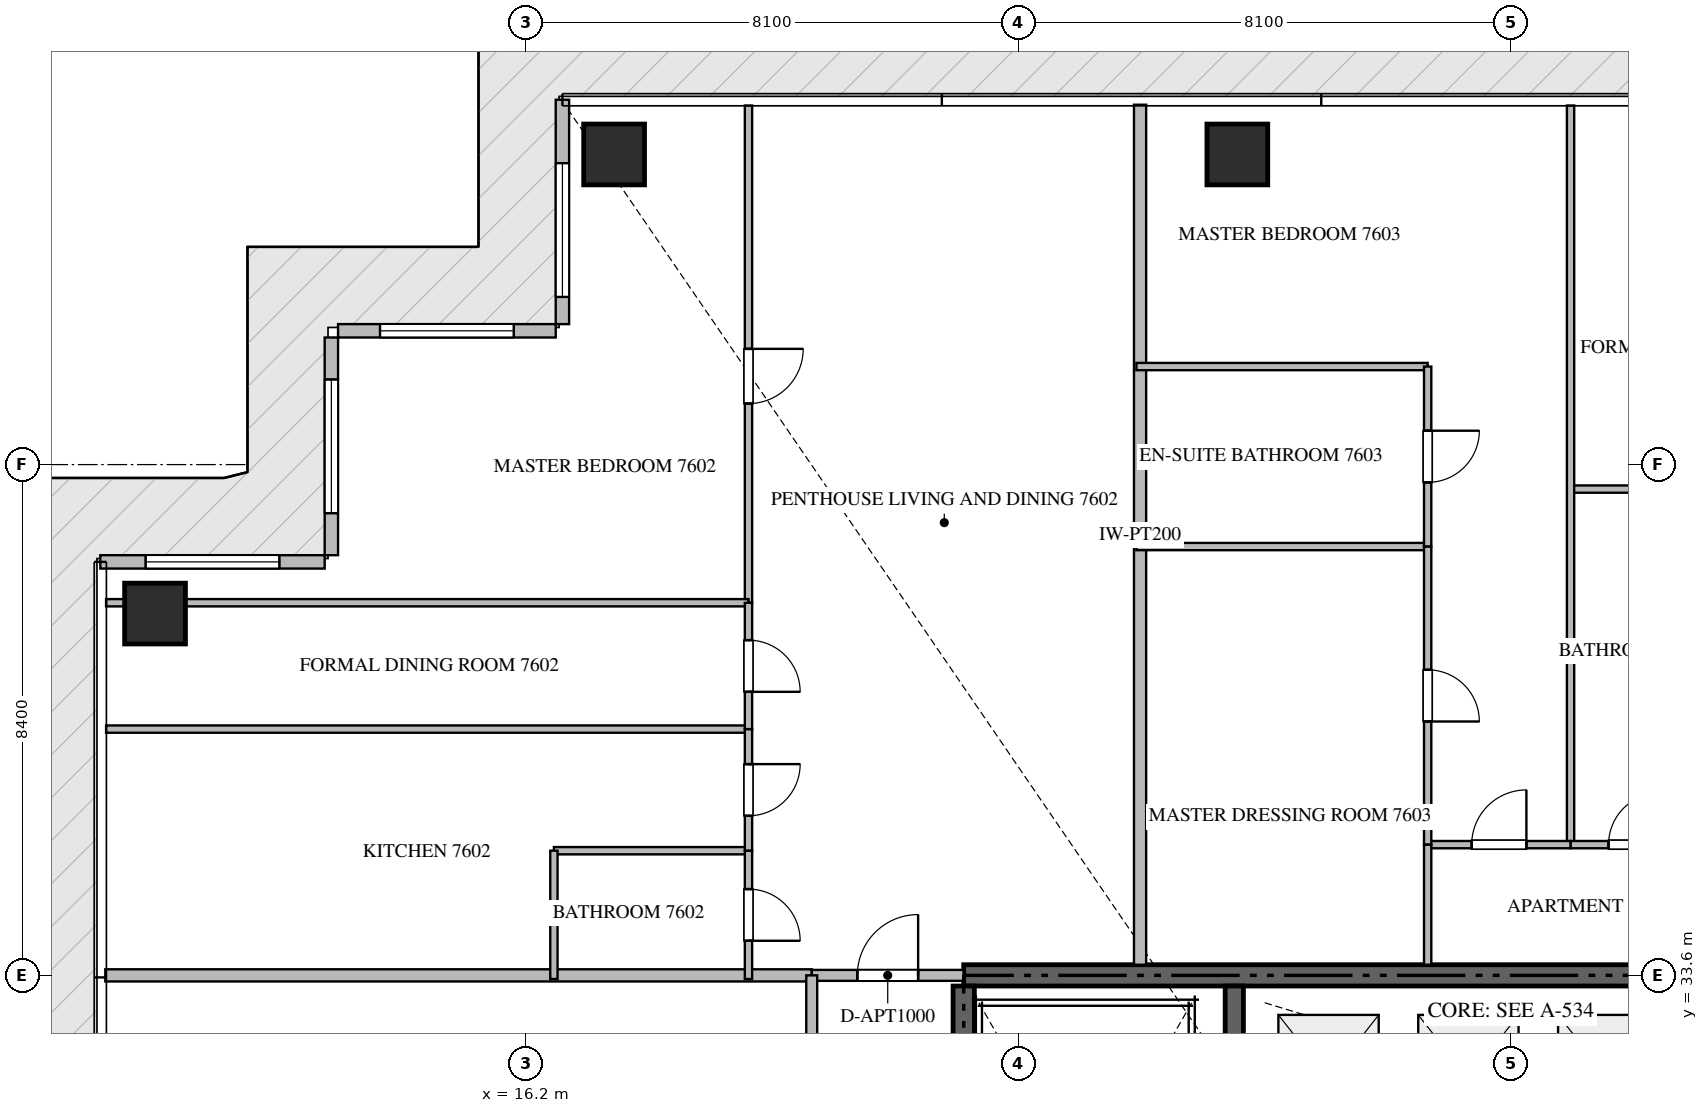
"""IFC4 building model, lengths in metres.
Left out: names, types, materials, properties, quantities, classifications, styles, units other than length and angle.
Written with IfcOpenShell. Run it as: python <this file> out.ifc"""

import sys

from ifc_helpers import new_model, si_unit, direction, frame, frame_2d, origin, origin_2d, place, context, subcontext, project, spatial, rectangle, extrude, source, transform, mapped, element, fill, save


model = new_model("IFC4")
c1 = context("Model", 3, precision=1e-05, world=origin(), true_north=direction((0.0, 1.0)))
c2 = subcontext(c1, "Body", "Model", "MODEL_VIEW")
j1 = project(units=[si_unit("LENGTHUNIT", "METRE"), si_unit("PLANEANGLEUNIT", "RADIAN")], contexts=[c1])
p1 = place(None, origin())
s1 = spatial("IfcSite", under=j1, at=p1, CompositionType="ELEMENT")
p2 = place(p1, origin())
s2 = spatial("IfcBuilding", under=s1, at=p2, CompositionType="ELEMENT")
p3 = place(p2, frame((0.0, 0.0, 305.6)))
s3 = spatial("IfcBuildingStorey", under=s2, at=p3, CompositionType="ELEMENT", Elevation=305.6)
p4 = place(p3, frame((41.4, 33.6, -0.26), z_axis=(0.0, 0.0, 1.0), x_axis=(-1.0, 0.0, 0.0)))
e1 = element("IfcWall", 1, at=p4, inside=s3, PredefinedType="SHEAR", context=c2, shape_type="SweptSolid", body=[
    extrude(rectangle(XDim=18.0, YDim=0.35, at=frame_2d((9.0, 0.0))), origin(), (0.0, 0.0, 1.0), 4.048),
])
p5 = place(p3, frame((23.4, 24.25, -0.26), z_axis=(0.0, 0.0, 1.0), x_axis=(0.0, 1.0, 0.0)))
e2 = element("IfcWall", 2, at=p5, inside=s3, PredefinedType="SHEAR", context=c2, shape_type="SweptSolid", body=[
    extrude(rectangle(XDim=9.175, YDim=0.35, at=frame_2d((4.587, 0.0))), origin(), (0.0, 0.0, 1.0), 4.048),
])
p6 = place(p3, frame((27.85, 23.55, -0.26), z_axis=(0.0, 0.0, 1.0), x_axis=(0.0, 1.0, 0.0)))
e3 = element("IfcWall", 3, at=p6, inside=s3, PredefinedType="SHEAR", context=c2, shape_type="SweptSolid", body=[
    extrude(rectangle(XDim=9.875, YDim=0.3, at=frame_2d((4.938, 0.0))), origin(), (0.0, 0.0, 1.0), 4.048),
])
m1 = source(origin(), c2, "Body", "SweptSolid", [
    extrude(rectangle(XDim=1.0, YDim=1.0, at=origin_2d()), origin(), (0.0, 0.0, 1.0), 4.05),
])
for number, where, z_axis, x_axis in (
    (4, (17.65, 47.1, -0.26), (0.0, 0.0, 1.0), (1.0, 0.0, 0.0)),
    (5, (27.9, 47.1, -0.26), (0.0, 0.0, 1.0), (1.0, 0.0, 0.0)),
    (6, (10.1, 39.55, -0.26), (0.0, 0.0, 1.0), (1.0, 0.0, 0.0)),
):
    element("IfcColumn", number, at=place(p3, frame(where, z_axis=z_axis, x_axis=x_axis)), inside=s3, PredefinedType="COLUMN", context=c2, shape_type="MappedRepresentation", body=[
        mapped(m1, transform((0.0, 0.0, 0.0), scale=1.0)),
    ])
p7 = place(p3, frame((16.8, 48.0, 0.0), z_axis=(0.0, 0.0, 1.0), x_axis=(0.0, -1.0, 0.0)))
e7 = element("IfcWall", 7, at=p7, inside=s3, PredefinedType="ELEMENTEDWALL", context=c2, shape_type="SweptSolid", body=[
    extrude(rectangle(XDim=3.69, YDim=0.22, at=frame_2d((1.845, 0.0))), origin(), (0.0, 0.0, 1.0), 3.775),
])
p8 = place(p7, frame((1.043, 0.0, 0.65)))
e8 = element("IfcOpeningElement", 8, at=p8, cuts=e7, PredefinedType="OPENING", context=c2, shape_type="SweptSolid", body=[
    extrude(rectangle(XDim=2.2, YDim=2.4, at=frame_2d((1.1, 1.2))), frame((0.0, 0.12, 0.0), z_axis=(0.0, -1.0, 0.0), x_axis=(1.0, 0.0, 0.0)), (0.0, 0.0, 1.0), 0.24),
])
p9 = place(p3, frame((16.69, 44.2, 0.0), z_axis=(0.0, 0.0, 1.0), x_axis=(-1.0, 0.0, 0.0)))
e9 = element("IfcWall", 9, at=p9, inside=s3, PredefinedType="ELEMENTEDWALL", context=c2, shape_type="SweptSolid", body=[
    extrude(rectangle(XDim=3.58, YDim=0.22, at=frame_2d((1.79, 0.0))), origin(), (0.0, 0.0, 1.0), 3.775),
])
p10 = place(p9, frame((0.69, 0.0, 0.65)))
e10 = element("IfcOpeningElement", 10, at=p10, cuts=e9, PredefinedType="OPENING", context=c2, shape_type="SweptSolid", body=[
    extrude(rectangle(XDim=2.2, YDim=2.4, at=frame_2d((1.1, 1.2))), frame((0.0, 0.12, 0.0), z_axis=(0.0, -1.0, 0.0), x_axis=(1.0, 0.0, 0.0)), (0.0, 0.0, 1.0), 0.24),
])
p11 = place(p3, frame((13.0, 44.09, 0.0), z_axis=(0.0, 0.0, 1.0), x_axis=(0.0, -1.0, 0.0)))
e11 = element("IfcWall", 11, at=p11, inside=s3, PredefinedType="ELEMENTEDWALL", context=c2, shape_type="SweptSolid", body=[
    extrude(rectangle(XDim=3.58, YDim=0.22, at=frame_2d((1.79, 0.0))), origin(), (0.0, 0.0, 1.0), 3.775),
])
p12 = place(p11, frame((0.69, 0.0, 0.65)))
e12 = element("IfcOpeningElement", 12, at=p12, cuts=e11, PredefinedType="OPENING", context=c2, shape_type="SweptSolid", body=[
    extrude(rectangle(XDim=2.2, YDim=2.4, at=frame_2d((1.1, 1.2))), frame((0.0, 0.12, 0.0), z_axis=(0.0, -1.0, 0.0), x_axis=(1.0, 0.0, 0.0)), (0.0, 0.0, 1.0), 0.24),
])
p13 = place(p3, frame((12.89, 40.4, 0.0), z_axis=(0.0, 0.0, 1.0), x_axis=(-1.0, 0.0, 0.0)))
e13 = element("IfcWall", 13, at=p13, inside=s3, PredefinedType="ELEMENTEDWALL", context=c2, shape_type="SweptSolid", body=[
    extrude(rectangle(XDim=3.69, YDim=0.22, at=frame_2d((1.845, 0.0))), origin(), (0.0, 0.0, 1.0), 3.775),
])
p14 = place(p13, frame((0.745, 0.0, 0.65)))
e14 = element("IfcOpeningElement", 14, at=p14, cuts=e13, PredefinedType="OPENING", context=c2, shape_type="SweptSolid", body=[
    extrude(rectangle(XDim=2.2, YDim=2.4, at=frame_2d((1.1, 1.2))), frame((0.0, 0.12, 0.0), z_axis=(0.0, -1.0, 0.0), x_axis=(1.0, 0.0, 0.0)), (0.0, 0.0, 1.0), 0.24),
])
p15 = place(p3, frame((26.3, 33.775, 0.0), z_axis=(0.0, 0.0, 1.0), x_axis=(0.0, 1.0, 0.0)))
e15 = element("IfcWall", 15, at=p15, inside=s3, PredefinedType="PARTITIONING", context=c2, shape_type="SweptSolid", body=[
    extrude(rectangle(XDim=14.143, YDim=0.2, at=frame_2d((7.072, 0.0))), origin(), (0.0, 0.0, 1.0), 3.79),
])
p16 = place(p3, frame((9.282, 33.6, 0.0), z_axis=(0.0, 0.0, 1.0), x_axis=(1.0, 0.0, 0.0)))
e16 = element("IfcWall", 16, at=p16, inside=s3, PredefinedType="PARTITIONING", context=c2, shape_type="SweptSolid", body=[
    extrude(rectangle(XDim=11.618, YDim=0.2, at=frame_2d((5.809, 0.0))), origin(), (0.0, 0.0, 1.0), 3.79),
])
p17 = place(p3, frame((20.902, 33.6, 0.0), z_axis=(0.0, 0.0, 1.0), x_axis=(1.0, 0.0, 0.0)))
e17 = element("IfcWall", 17, at=p17, inside=s3, PredefinedType="PARTITIONING", context=c2, shape_type="SweptSolid", body=[
    extrude(rectangle(XDim=2.496, YDim=0.18, at=frame_2d((1.248, 0.0))), origin(), (0.0, 0.0, 1.0), 3.79),
])
p18 = place(p17, frame((0.748, 0.0, 0.0)))
e18 = element("IfcOpeningElement", 18, at=p18, cuts=e17, PredefinedType="OPENING", context=c2, shape_type="SweptSolid", body=[
    extrude(rectangle(XDim=1.0, YDim=2.15, at=frame_2d((0.5, 1.075))), frame((0.0, 0.1, 0.0), z_axis=(0.0, -1.0, 0.0), x_axis=(1.0, 0.0, 0.0)), (0.0, 0.0, 1.0), 0.2),
])
p19 = place(p3, frame((20.9, 16.8, 0.0), z_axis=(0.0, 0.0, 1.0), x_axis=(0.0, 1.0, 0.0)))
e19 = element("IfcWall", 19, at=p19, inside=s3, PredefinedType="PARTITIONING", context=c2, shape_type="SweptSolid", body=[
    extrude(rectangle(XDim=16.8, YDim=0.18, at=frame_2d((8.4, 0.0))), origin(), (0.0, 0.0, 1.0), 3.79),
])
p20 = place(p19, frame((4.803, 0.0, 0.0)))
e20 = element("IfcOpeningElement", 20, at=p20, cuts=e19, PredefinedType="OPENING", context=c2, shape_type="SweptSolid", body=[
    extrude(rectangle(XDim=1.0, YDim=2.15, at=frame_2d((0.5, 1.075))), frame((0.0, 0.1, 0.0), z_axis=(0.0, -1.0, 0.0), x_axis=(1.0, 0.0, 0.0)), (0.0, 0.0, 1.0), 0.2),
])
p21 = place(p19, frame((13.225, 0.0, 0.0)))
e21 = element("IfcOpeningElement", 21, at=p21, cuts=e19, PredefinedType="OPENING", context=c2, shape_type="SweptSolid", body=[
    extrude(rectangle(XDim=1.0, YDim=2.15, at=frame_2d((0.5, 1.075))), frame((0.0, 0.1, 0.0), z_axis=(0.0, -1.0, 0.0), x_axis=(1.0, 0.0, 0.0)), (0.0, 0.0, 1.0), 0.2),
])
p22 = place(p3, frame((19.86, 47.905, 0.0), z_axis=(0.0, 0.0, 1.0), x_axis=(0.0, -1.0, 0.0)))
e22 = element("IfcWall", 22, at=p22, inside=s3, PredefinedType="PARTITIONING", context=c2, shape_type="SweptSolid", body=[
    extrude(rectangle(XDim=8.177, YDim=0.12, at=frame_2d((4.088, 0.0))), origin(), (0.0, 0.0, 1.0), 3.79),
])
p23 = place(p22, frame((4.002, 0.0, 0.0)))
e23 = element("IfcOpeningElement", 23, at=p23, cuts=e22, PredefinedType="OPENING", context=c2, shape_type="SweptSolid", body=[
    extrude(rectangle(XDim=0.9, YDim=2.1, at=frame_2d((0.45, 1.05))), frame((0.0, 0.07, 0.0), z_axis=(0.0, -1.0, 0.0), x_axis=(1.0, 0.0, 0.0)), (0.0, 0.0, 1.0), 0.14),
])
p24 = place(p3, frame((9.295, 39.728, 0.0), z_axis=(0.0, 0.0, 1.0), x_axis=(1.0, 0.0, 0.0)))
e24 = element("IfcWall", 24, at=p24, inside=s3, PredefinedType="PARTITIONING", context=c2, shape_type="SweptSolid", body=[
    extrude(rectangle(XDim=10.565, YDim=0.12, at=frame_2d((5.283, 0.0))), origin(), (0.0, 0.0, 1.0), 3.292),
])
p25 = place(p3, frame((9.295, 37.65, 0.0), z_axis=(0.0, 0.0, 1.0), x_axis=(1.0, 0.0, 0.0)))
e25 = element("IfcWall", 25, at=p25, inside=s3, PredefinedType="PARTITIONING", context=c2, shape_type="SweptSolid", body=[
    extrude(rectangle(XDim=10.565, YDim=0.12, at=frame_2d((5.283, 0.0))), origin(), (0.0, 0.0, 1.0), 3.79),
])
p26 = place(p3, frame((16.66, 35.65, 0.0), z_axis=(0.0, 0.0, 1.0), x_axis=(1.0, 0.0, 0.0)))
e26 = element("IfcWall", 26, at=p26, inside=s3, PredefinedType="PARTITIONING", context=c2, shape_type="SweptSolid", body=[
    extrude(rectangle(XDim=3.2, YDim=0.12, at=frame_2d((1.6, 0.0))), origin(), (0.0, 0.0, 1.0), 3.79),
])
p27 = place(p3, frame((16.66, 35.65, 0.0), z_axis=(0.0, 0.0, 1.0), x_axis=(0.0, -1.0, 0.0)))
e27 = element("IfcWall", 27, at=p27, inside=s3, PredefinedType="PARTITIONING", context=c2, shape_type="SweptSolid", body=[
    extrude(rectangle(XDim=2.11, YDim=0.12, at=frame_2d((1.055, 0.0))), origin(), (0.0, 0.0, 1.0), 3.79),
])
p28 = place(p3, frame((19.86, 39.726, 0.0), z_axis=(0.0, 0.0, 1.0), x_axis=(0.0, -1.0, 0.0)))
e28 = element("IfcWall", 28, at=p28, inside=s3, PredefinedType="PARTITIONING", context=c2, shape_type="SweptSolid", body=[
    extrude(rectangle(XDim=2.076, YDim=0.12, at=frame_2d((1.038, 0.0))), origin(), (0.0, 0.0, 1.0), 3.79),
])
p29 = place(p28, frame((0.613, 0.0, 0.0)))
e29 = element("IfcOpeningElement", 29, at=p29, cuts=e28, PredefinedType="OPENING", context=c2, shape_type="SweptSolid", body=[
    extrude(rectangle(XDim=0.85, YDim=2.1, at=frame_2d((0.425, 1.05))), frame((0.0, 0.07, 0.0), z_axis=(0.0, -1.0, 0.0), x_axis=(1.0, 0.0, 0.0)), (0.0, 0.0, 1.0), 0.14),
])
p30 = place(p3, frame((19.86, 37.648, 0.0), z_axis=(0.0, 0.0, 1.0), x_axis=(0.0, -1.0, 0.0)))
e30 = element("IfcWall", 30, at=p30, inside=s3, PredefinedType="PARTITIONING", context=c2, shape_type="SweptSolid", body=[
    extrude(rectangle(XDim=1.998, YDim=0.12, at=frame_2d((0.999, 0.0))), origin(), (0.0, 0.0, 1.0), 3.79),
])
p31 = place(p30, frame((0.574, 0.0, 0.0)))
e31 = element("IfcOpeningElement", 31, at=p31, cuts=e30, PredefinedType="OPENING", context=c2, shape_type="SweptSolid", body=[
    extrude(rectangle(XDim=0.85, YDim=2.1, at=frame_2d((0.425, 1.05))), frame((0.0, 0.07, 0.0), z_axis=(0.0, -1.0, 0.0), x_axis=(1.0, 0.0, 0.0)), (0.0, 0.0, 1.0), 0.14),
])
p32 = place(p3, frame((19.86, 35.648, 0.0), z_axis=(0.0, 0.0, 1.0), x_axis=(0.0, -1.0, 0.0)))
e32 = element("IfcWall", 32, at=p32, inside=s3, PredefinedType="PARTITIONING", context=c2, shape_type="SweptSolid", body=[
    extrude(rectangle(XDim=2.108, YDim=0.12, at=frame_2d((1.054, 0.0))), origin(), (0.0, 0.0, 1.0), 3.79),
])
p33 = place(p32, frame((0.629, 0.0, 0.0)))
e33 = element("IfcOpeningElement", 33, at=p33, cuts=e32, PredefinedType="OPENING", context=c2, shape_type="SweptSolid", body=[
    extrude(rectangle(XDim=0.85, YDim=2.1, at=frame_2d((0.425, 1.05))), frame((0.0, 0.07, 0.0), z_axis=(0.0, -1.0, 0.0), x_axis=(1.0, 0.0, 0.0)), (0.0, 0.0, 1.0), 0.14),
])
p34 = place(p3, frame((33.38, 41.597, 0.0), z_axis=(0.0, 0.0, 1.0), x_axis=(1.0, 0.0, 0.0)))
e34 = element("IfcWall", 34, at=p34, inside=s3, PredefinedType="PARTITIONING", context=c2, shape_type="SweptSolid", body=[
    extrude(rectangle(XDim=5.12, YDim=0.12, at=frame_2d((2.56, 0.0))), origin(), (0.0, 0.0, 1.0), 3.79),
])
p35 = place(p3, frame((33.38, 47.905, 0.0), z_axis=(0.0, 0.0, 1.0), x_axis=(0.0, -1.0, 0.0)))
e35 = element("IfcWall", 35, at=p35, inside=s3, PredefinedType="PARTITIONING", context=c2, shape_type="SweptSolid", body=[
    extrude(rectangle(XDim=12.155, YDim=0.12, at=frame_2d((6.078, 0.0))), origin(), (0.0, 0.0, 1.0), 3.79),
])
p36 = place(p3, frame((33.38, 35.75, 0.0), z_axis=(0.0, 0.0, 1.0), x_axis=(1.0, 0.0, 0.0)))
e36 = element("IfcWall", 36, at=p36, inside=s3, PredefinedType="PARTITIONING", context=c2, shape_type="SweptSolid", body=[
    extrude(rectangle(XDim=2.1, YDim=0.12, at=frame_2d((1.05, 0.0))), origin(), (0.0, 0.0, 1.0), 3.79),
])
p37 = place(p36, frame((0.625, 0.0, 0.0)))
e37 = element("IfcOpeningElement", 37, at=p37, cuts=e36, PredefinedType="OPENING", context=c2, shape_type="SweptSolid", body=[
    extrude(rectangle(XDim=0.85, YDim=2.1, at=frame_2d((0.425, 1.05))), frame((0.0, 0.07, 0.0), z_axis=(0.0, -1.0, 0.0), x_axis=(1.0, 0.0, 0.0)), (0.0, 0.0, 1.0), 0.14),
])
p38 = place(p3, frame((31.03, 35.75, 0.0), z_axis=(0.0, 0.0, 1.0), x_axis=(1.0, 0.0, 0.0)))
e38 = element("IfcWall", 38, at=p38, inside=s3, PredefinedType="PARTITIONING", context=c2, shape_type="SweptSolid", body=[
    extrude(rectangle(XDim=2.348, YDim=0.12, at=frame_2d((1.174, 0.0))), origin(), (0.0, 0.0, 1.0), 3.79),
])
p39 = place(p38, frame((0.724, 0.0, 0.0)))
e39 = element("IfcOpeningElement", 39, at=p39, cuts=e38, PredefinedType="OPENING", context=c2, shape_type="SweptSolid", body=[
    extrude(rectangle(XDim=0.9, YDim=2.1, at=frame_2d((0.45, 1.05))), frame((0.0, 0.07, 0.0), z_axis=(0.0, -1.0, 0.0), x_axis=(1.0, 0.0, 0.0)), (0.0, 0.0, 1.0), 0.14),
])
for number, where, z_axis, x_axis in (
    (40, (26.24, 43.612, 0.0), (0.0, 0.0, 1.0), (1.0, 0.0, 0.0)),
    (41, (26.24, 40.652, 0.0), (0.0, 0.0, 1.0), (1.0, 0.0, 0.0)),
):
    element("IfcWall", number, at=place(p3, frame(where, z_axis=z_axis, x_axis=x_axis)), inside=s3, PredefinedType="PARTITIONING", context=c2, shape_type="SweptSolid", body=[
        extrude(rectangle(XDim=4.79, YDim=0.12, at=frame_2d((2.395, 0.0))), origin(), (0.0, 0.0, 1.0), 3.79),
    ])
p40 = place(p3, frame((31.03, 43.612, 0.0), z_axis=(0.0, 0.0, 1.0), x_axis=(0.0, -1.0, 0.0)))
e42 = element("IfcWall", 42, at=p40, inside=s3, PredefinedType="PARTITIONING", context=c2, shape_type="SweptSolid", body=[
    extrude(rectangle(XDim=2.96, YDim=0.12, at=frame_2d((1.48, 0.0))), origin(), (0.0, 0.0, 1.0), 3.79),
])
p41 = place(p40, frame((1.055, 0.0, 0.0)))
e43 = element("IfcOpeningElement", 43, at=p41, cuts=e42, PredefinedType="OPENING", context=c2, shape_type="SweptSolid", body=[
    extrude(rectangle(XDim=0.85, YDim=2.1, at=frame_2d((0.425, 1.05))), frame((0.0, 0.07, 0.0), z_axis=(0.0, -1.0, 0.0), x_axis=(1.0, 0.0, 0.0)), (0.0, 0.0, 1.0), 0.14),
])
p42 = place(p3, frame((31.03, 40.65, 0.0), z_axis=(0.0, 0.0, 1.0), x_axis=(0.0, -1.0, 0.0)))
e44 = element("IfcWall", 44, at=p42, inside=s3, PredefinedType="PARTITIONING", context=c2, shape_type="SweptSolid", body=[
    extrude(rectangle(XDim=4.9, YDim=0.12, at=frame_2d((2.45, 0.0))), origin(), (0.0, 0.0, 1.0), 3.79),
])
p43 = place(p42, frame((2.025, 0.0, 0.0)))
e45 = element("IfcOpeningElement", 45, at=p43, cuts=e44, PredefinedType="OPENING", context=c2, shape_type="SweptSolid", body=[
    extrude(rectangle(XDim=0.85, YDim=2.1, at=frame_2d((0.425, 1.05))), frame((0.0, 0.07, 0.0), z_axis=(0.0, -1.0, 0.0), x_axis=(1.0, 0.0, 0.0)), (0.0, 0.0, 1.0), 0.14),
])
p44 = place(p3, frame((31.03, 35.748, 0.0), z_axis=(0.0, 0.0, 1.0), x_axis=(0.0, -1.0, 0.0)))
e46 = element("IfcWall", 46, at=p44, inside=s3, PredefinedType="PARTITIONING", context=c2, shape_type="SweptSolid", body=[
    extrude(rectangle(XDim=1.973, YDim=0.12, at=frame_2d((0.987, 0.0))), origin(), (0.0, 0.0, 1.0), 3.79),
])
m2 = source(origin(), c2, "Body", "SweptSolid", [
    extrude(rectangle(XDim=2.2, YDim=2.4, at=frame_2d((1.1, 1.2))), frame((0.0, 0.03, 0.0), z_axis=(0.0, -1.0, 0.0), x_axis=(1.0, 0.0, 0.0)), (0.0, 0.0, 1.0), 0.06),
])
p45 = place(p8, origin())
e47 = element("IfcWindow", 47, at=p45, inside=s3, PartitioningType="SINGLE_PANEL", PredefinedType="WINDOW", context=c2, shape_type="MappedRepresentation", body=[
    mapped(m2, transform((0.0, 0.0, 0.0), scale=1.0)),
])
fill(e8, e47)
p46 = place(p10, origin())
e48 = element("IfcWindow", 48, at=p46, inside=s3, PartitioningType="SINGLE_PANEL", PredefinedType="WINDOW", context=c2, shape_type="MappedRepresentation", body=[
    mapped(m2, transform((0.0, 0.0, 0.0), scale=1.0)),
])
fill(e10, e48)
p47 = place(p12, origin())
e49 = element("IfcWindow", 49, at=p47, inside=s3, PartitioningType="SINGLE_PANEL", PredefinedType="WINDOW", context=c2, shape_type="MappedRepresentation", body=[
    mapped(m2, transform((0.0, 0.0, 0.0), scale=1.0)),
])
fill(e12, e49)
p48 = place(p14, origin())
e50 = element("IfcWindow", 50, at=p48, inside=s3, PartitioningType="SINGLE_PANEL", PredefinedType="WINDOW", context=c2, shape_type="MappedRepresentation", body=[
    mapped(m2, transform((0.0, 0.0, 0.0), scale=1.0)),
])
fill(e14, e50)
m3 = source(origin(), c2, "Body", "SweptSolid", [
    extrude(rectangle(XDim=1.0, YDim=2.15, at=frame_2d((0.5, 1.075))), frame((0.0, 0.025, 0.0), z_axis=(0.0, -1.0, 0.0), x_axis=(1.0, 0.0, 0.0)), (0.0, 0.0, 1.0), 0.05),
])
p49 = place(p18, origin())
e51 = element("IfcDoor", 51, at=p49, inside=s3, OperationType="SINGLE_SWING_RIGHT", PredefinedType="DOOR", context=c2, shape_type="MappedRepresentation", body=[
    mapped(m3, transform((0.0, 0.0, 0.0), scale=1.0)),
])
fill(e18, e51)
m4 = source(origin(), c2, "Body", "SweptSolid", [
    extrude(rectangle(XDim=0.9, YDim=2.1, at=frame_2d((0.45, 1.05))), frame((0.0, 0.025, 0.0), z_axis=(0.0, -1.0, 0.0), x_axis=(1.0, 0.0, 0.0)), (0.0, 0.0, 1.0), 0.05),
])
p50 = place(p23, origin())
e52 = element("IfcDoor", 52, at=p50, inside=s3, OperationType="SINGLE_SWING_LEFT", PredefinedType="DOOR", context=c2, shape_type="MappedRepresentation", body=[
    mapped(m4, transform((0.0, 0.0, 0.0), scale=1.0)),
])
fill(e23, e52)
m5 = source(origin(), c2, "Body", "SweptSolid", [
    extrude(rectangle(XDim=0.85, YDim=2.1, at=frame_2d((0.425, 1.05))), frame((0.0, 0.025, 0.0), z_axis=(0.0, -1.0, 0.0), x_axis=(1.0, 0.0, 0.0)), (0.0, 0.0, 1.0), 0.05),
])
p51 = place(p29, origin())
e53 = element("IfcDoor", 53, at=p51, inside=s3, OperationType="SINGLE_SWING_RIGHT", PredefinedType="DOOR", context=c2, shape_type="MappedRepresentation", body=[
    mapped(m5, transform((0.0, 0.0, 0.0), scale=1.0)),
])
fill(e29, e53)
p52 = place(p31, origin())
e54 = element("IfcDoor", 54, at=p52, inside=s3, OperationType="SINGLE_SWING_LEFT", PredefinedType="DOOR", context=c2, shape_type="MappedRepresentation", body=[
    mapped(m5, transform((0.0, 0.0, 0.0), scale=1.0)),
])
fill(e31, e54)
p53 = place(p33, origin())
e55 = element("IfcDoor", 55, at=p53, inside=s3, OperationType="SINGLE_SWING_RIGHT", PredefinedType="DOOR", context=c2, shape_type="MappedRepresentation", body=[
    mapped(m5, transform((0.0, 0.0, 0.0), scale=1.0)),
])
fill(e33, e55)
p54 = place(p37, origin())
e56 = element("IfcDoor", 56, at=p54, inside=s3, OperationType="SINGLE_SWING_RIGHT", PredefinedType="DOOR", context=c2, shape_type="MappedRepresentation", body=[
    mapped(m5, transform((0.0, 0.0, 0.0), scale=1.0)),
])
fill(e37, e56)
p55 = place(p39, origin())
e57 = element("IfcDoor", 57, at=p55, inside=s3, OperationType="SINGLE_SWING_RIGHT", PredefinedType="DOOR", context=c2, shape_type="MappedRepresentation", body=[
    mapped(m4, transform((0.0, 0.0, 0.0), scale=1.0)),
])
fill(e39, e57)
p56 = place(p41, origin())
e58 = element("IfcDoor", 58, at=p56, inside=s3, OperationType="SINGLE_SWING_LEFT", PredefinedType="DOOR", context=c2, shape_type="MappedRepresentation", body=[
    mapped(m5, transform((0.0, 0.0, 0.0), scale=1.0)),
])
fill(e43, e58)
p57 = place(p43, origin())
e59 = element("IfcDoor", 59, at=p57, inside=s3, OperationType="SINGLE_SWING_RIGHT", PredefinedType="DOOR", context=c2, shape_type="MappedRepresentation", body=[
    mapped(m5, transform((0.0, 0.0, 0.0), scale=1.0)),
])
fill(e45, e59)
save(model, sys.argv[1])
